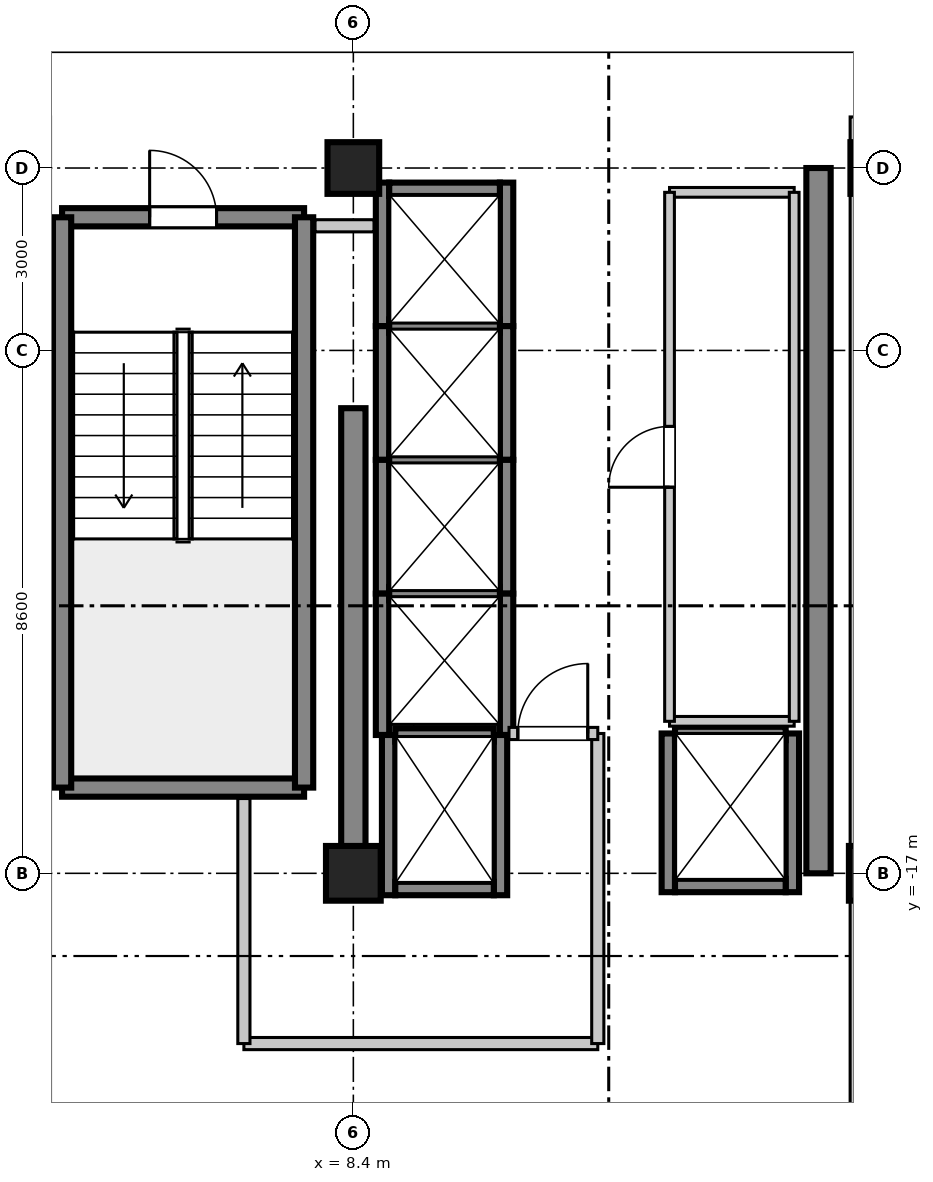
"""IFC4 building model, lengths in metres.
Left out: names, types, materials, properties, quantities, classifications, styles, units other than length and angle.
Written with IfcOpenShell. Run it as: python <this file> out.ifc"""

import sys

from ifc_helpers import new_model, si_unit, direction, frame, frame_2d, origin, origin_2d, place, context, subcontext, project, spatial, rectangle, extrude, source, transform, mapped, element, fill, save


model = new_model("IFC4")
c1 = context("Model", 3, precision=1e-05, world=origin(), true_north=direction((0.0, 1.0)))
c2 = subcontext(c1, "Body", "Model", "MODEL_VIEW")
j1 = project(units=[si_unit("LENGTHUNIT", "METRE"), si_unit("PLANEANGLEUNIT", "RADIAN")], contexts=[c1])
p1 = place(None, origin())
s1 = spatial("IfcSite", under=j1, at=p1, CompositionType="ELEMENT")
p2 = place(p1, origin())
s2 = spatial("IfcBuilding", under=s1, at=p2, CompositionType="ELEMENT")
p3 = place(p2, frame((0.0, 0.0, 296.5)))
s3 = spatial("IfcBuildingStorey", under=s2, at=p3, CompositionType="ELEMENT", Elevation=296.5)
m1 = source(origin(), c2, "Body", "SweptSolid", [
    extrude(rectangle(XDim=0.9, YDim=0.9, at=origin_2d()), origin(), (0.0, 0.0, 1.0), 3.805),
])
p4 = place(p3, frame((8.4, -17.0, 0.0), z_axis=(0.0, 0.0, 1.0), x_axis=(1.0, 0.0, 0.0)))
e1 = element("IfcColumn", 1, at=p4, inside=s3, PredefinedType="COLUMN", context=c2, shape_type="MappedRepresentation", body=[
    mapped(m1, transform((0.0, 0.0, 0.0), scale=1.0)),
])
m2 = source(origin(), c2, "Body", "SweptSolid", [
    extrude(rectangle(XDim=0.85, YDim=0.85, at=origin_2d()), origin(), (0.0, 0.0, 1.0), 3.805),
])
p5 = place(p3, frame((8.4, -5.4, 0.0), z_axis=(0.0, 0.0, 1.0), x_axis=(1.0, 0.0, 0.0)))
e2 = element("IfcColumn", 2, at=p5, inside=s3, PredefinedType="PILASTER", context=c2, shape_type="MappedRepresentation", body=[
    mapped(m2, transform((0.0, 0.0, 0.0), scale=1.0)),
])
p6 = place(p3, frame((17.0, -17.0, 0.0), z_axis=(0.0, 0.0, 1.0), x_axis=(1.0, 0.0, 0.0)))
e3 = element("IfcColumn", 3, at=p6, inside=s3, PredefinedType="COLUMN", context=c2, shape_type="MappedRepresentation", body=[
    mapped(m1, transform((0.0, 0.0, 0.0), scale=1.0)),
])
p7 = place(p3, frame((17.0, -5.4, 0.0), z_axis=(0.0, 0.0, 1.0), x_axis=(1.0, 0.0, 0.0)))
e4 = element("IfcColumn", 4, at=p7, inside=s3, PredefinedType="PILASTER", context=c2, shape_type="MappedRepresentation", body=[
    mapped(m2, transform((0.0, 0.0, 0.0), scale=1.0)),
])
m3 = source(origin(), c2, "Body", "SweptSolid", [
    extrude(rectangle(XDim=7.65, YDim=0.4, at=frame_2d((3.825, 0.0))), origin(), (0.0, 0.0, 1.0), 3.55),
])
p8 = place(p3, frame((8.4, -17.0, 0.0), z_axis=(0.0, 0.0, 1.0), x_axis=(0.0, 1.0, 0.0)))
e5 = element("IfcWall", 5, at=p8, inside=s3, PredefinedType="SHEAR", context=c2, shape_type="MappedRepresentation", body=[
    mapped(m3, transform((0.0, 0.0, 0.0), scale=1.0)),
])
m4 = source(origin(), c2, "Body", "SweptSolid", [
    extrude(rectangle(XDim=11.6, YDim=0.4, at=frame_2d((5.8, 0.0))), origin(), (0.0, 0.0, 1.0), 3.55),
])
p9 = place(p3, frame((16.05, -17.0, 0.0), z_axis=(0.0, 0.0, 1.0), x_axis=(0.0, 1.0, 0.0)))
e6 = element("IfcWall", 6, at=p9, inside=s3, PredefinedType="SHEAR", context=c2, shape_type="MappedRepresentation", body=[
    mapped(m4, transform((0.0, 0.0, 0.0), scale=1.0)),
])
m5 = source(origin(), c2, "Body", "SweptSolid", [
    extrude(rectangle(XDim=3.98, YDim=0.3, at=frame_2d((1.99, 0.0))), origin(), (0.0, 0.0, 1.0), 3.55),
])
p10 = place(p3, frame((3.61, -15.59, 0.0), z_axis=(0.0, 0.0, 1.0), x_axis=(1.0, 0.0, 0.0)))
e7 = element("IfcWall", 7, at=p10, inside=s3, PredefinedType="SHEAR", context=c2, shape_type="MappedRepresentation", body=[
    mapped(m5, transform((0.0, 0.0, 0.0), scale=1.0)),
])
p11 = place(p3, frame((3.61, -6.21, 0.0), z_axis=(0.0, 0.0, 1.0), x_axis=(1.0, 0.0, 0.0)))
e8 = element("IfcWall", 8, at=p11, inside=s3, PredefinedType="SHEAR", context=c2, shape_type="MappedRepresentation", body=[
    mapped(m5, transform((0.0, 0.0, 0.0), scale=1.0)),
])
p12 = place(p11, frame((1.44, 0.0, 0.0)))
e9 = element("IfcOpeningElement", 9, at=p12, cuts=e8, PredefinedType="OPENING", context=c2, shape_type="SweptSolid", body=[
    extrude(rectangle(XDim=1.1, YDim=2.15, at=frame_2d((0.55, 1.075))), frame((0.0, 0.16, 0.0), z_axis=(0.0, -1.0, 0.0), x_axis=(1.0, 0.0, 0.0)), (0.0, 0.0, 1.0), 0.32),
])
m6 = source(origin(), c2, "Body", "SweptSolid", [
    extrude(rectangle(XDim=9.38, YDim=0.3, at=frame_2d((4.69, 0.0))), origin(), (0.0, 0.0, 1.0), 3.55),
])
for number, where, z_axis, x_axis in (
    (10, (3.61, -15.59, 0.0), (0.0, 0.0, 1.0), (0.0, 1.0, 0.0)),
    (11, (7.59, -15.59, 0.0), (0.0, 0.0, 1.0), (0.0, 1.0, 0.0)),
):
    element("IfcWall", number, at=place(p3, frame(where, z_axis=z_axis, x_axis=x_axis)), inside=s3, PredefinedType="SHEAR", context=c2, shape_type="MappedRepresentation", body=[
        mapped(m6, transform((0.0, 0.0, 0.0), scale=1.0)),
    ])
m7 = source(origin(), c2, "Body", "SweptSolid", [
    extrude(rectangle(XDim=2.36, YDim=0.22, at=frame_2d((1.18, 0.0))), origin(), (0.0, 0.0, 1.0), 3.55),
])
for number, where, z_axis, x_axis in (
    (12, (8.88, -8.0, 0.0), (0.0, 0.0, 1.0), (0.0, 1.0, 0.0)),
    (13, (10.92, -8.0, 0.0), (0.0, 0.0, 1.0), (0.0, 1.0, 0.0)),
):
    element("IfcWall", number, at=place(p3, frame(where, z_axis=z_axis, x_axis=x_axis)), inside=s3, PredefinedType="SHEAR", context=c2, shape_type="MappedRepresentation", body=[
        mapped(m7, transform((0.0, 0.0, 0.0), scale=1.0)),
    ])
m8 = source(origin(), c2, "Body", "SweptSolid", [
    extrude(rectangle(XDim=1.82, YDim=0.22, at=frame_2d((0.91, 0.0))), origin(), (0.0, 0.0, 1.0), 3.55),
])
p13 = place(p3, frame((8.99, -5.75, 0.0), z_axis=(0.0, 0.0, 1.0), x_axis=(1.0, 0.0, 0.0)))
e14 = element("IfcWall", 14, at=p13, inside=s3, PredefinedType="SHEAR", context=c2, shape_type="MappedRepresentation", body=[
    mapped(m8, transform((0.0, 0.0, 0.0), scale=1.0)),
])
m9 = source(origin(), c2, "Body", "SweptSolid", [
    extrude(rectangle(XDim=2.2, YDim=0.22, at=frame_2d((1.1, 0.0))), origin(), (0.0, 0.0, 1.0), 3.55),
])
for number, where, z_axis, x_axis in (
    (15, (8.88, -10.2, 0.0), (0.0, 0.0, 1.0), (0.0, 1.0, 0.0)),
    (16, (10.92, -10.2, 0.0), (0.0, 0.0, 1.0), (0.0, 1.0, 0.0)),
):
    element("IfcWall", number, at=place(p3, frame(where, z_axis=z_axis, x_axis=x_axis)), inside=s3, PredefinedType="SHEAR", context=c2, shape_type="MappedRepresentation", body=[
        mapped(m9, transform((0.0, 0.0, 0.0), scale=1.0)),
    ])
m10 = source(origin(), c2, "Body", "SweptSolid", [
    extrude(rectangle(XDim=1.82, YDim=0.22, at=frame_2d((0.91, 0.0))), origin(), (0.0, 0.0, 1.0), 3.85),
])
p14 = place(p3, frame((8.99, -8.0, 0.0), z_axis=(0.0, 0.0, 1.0), x_axis=(1.0, 0.0, 0.0)))
e17 = element("IfcWall", 17, at=p14, inside=s3, PredefinedType="SHEAR", context=c2, shape_type="MappedRepresentation", body=[
    mapped(m10, transform((0.0, 0.0, 0.0), scale=1.0)),
])
for number, where, z_axis, x_axis in (
    (18, (8.88, -12.4, 0.0), (0.0, 0.0, 1.0), (0.0, 1.0, 0.0)),
    (19, (10.92, -12.4, 0.0), (0.0, 0.0, 1.0), (0.0, 1.0, 0.0)),
):
    element("IfcWall", number, at=place(p3, frame(where, z_axis=z_axis, x_axis=x_axis)), inside=s3, PredefinedType="SHEAR", context=c2, shape_type="MappedRepresentation", body=[
        mapped(m9, transform((0.0, 0.0, 0.0), scale=1.0)),
    ])
p15 = place(p3, frame((8.99, -10.2, 0.0), z_axis=(0.0, 0.0, 1.0), x_axis=(1.0, 0.0, 0.0)))
e20 = element("IfcWall", 20, at=p15, inside=s3, PredefinedType="SHEAR", context=c2, shape_type="MappedRepresentation", body=[
    mapped(m10, transform((0.0, 0.0, 0.0), scale=1.0)),
])
m11 = source(origin(), c2, "Body", "SweptSolid", [
    extrude(rectangle(XDim=2.325, YDim=0.22, at=frame_2d((1.163, 0.0))), origin(), (0.0, 0.0, 1.0), 3.55),
])
for number, where, z_axis, x_axis in (
    (21, (8.88, -14.725, 0.0), (0.0, 0.0, 1.0), (0.0, 1.0, 0.0)),
    (22, (10.92, -14.725, 0.0), (0.0, 0.0, 1.0), (0.0, 1.0, 0.0)),
):
    element("IfcWall", number, at=place(p3, frame(where, z_axis=z_axis, x_axis=x_axis)), inside=s3, PredefinedType="SHEAR", context=c2, shape_type="MappedRepresentation", body=[
        mapped(m11, transform((0.0, 0.0, 0.0), scale=1.0)),
    ])
p16 = place(p3, frame((8.99, -12.4, 0.0), z_axis=(0.0, 0.0, 1.0), x_axis=(1.0, 0.0, 0.0)))
e23 = element("IfcWall", 23, at=p16, inside=s3, PredefinedType="SHEAR", context=c2, shape_type="MappedRepresentation", body=[
    mapped(m10, transform((0.0, 0.0, 0.0), scale=1.0)),
])
m12 = source(origin(), c2, "Body", "SweptSolid", [
    extrude(rectangle(XDim=2.635, YDim=0.22, at=frame_2d((1.317, 0.0))), origin(), (0.0, 0.0, 1.0), 3.55),
])
for number, where, z_axis, x_axis in (
    (24, (8.98, -17.36, 0.0), (0.0, 0.0, 1.0), (0.0, 1.0, 0.0)),
    (25, (10.82, -17.36, 0.0), (0.0, 0.0, 1.0), (0.0, 1.0, 0.0)),
):
    element("IfcWall", number, at=place(p3, frame(where, z_axis=z_axis, x_axis=x_axis)), inside=s3, PredefinedType="SHEAR", context=c2, shape_type="MappedRepresentation", body=[
        mapped(m12, transform((0.0, 0.0, 0.0), scale=1.0)),
    ])
m13 = source(origin(), c2, "Body", "SweptSolid", [
    extrude(rectangle(XDim=1.62, YDim=0.22, at=frame_2d((0.81, 0.0))), origin(), (0.0, 0.0, 1.0), 3.55),
])
p17 = place(p3, frame((9.09, -17.25, 0.0), z_axis=(0.0, 0.0, 1.0), x_axis=(1.0, 0.0, 0.0)))
e26 = element("IfcWall", 26, at=p17, inside=s3, PredefinedType="SHEAR", context=c2, shape_type="MappedRepresentation", body=[
    mapped(m13, transform((0.0, 0.0, 0.0), scale=1.0)),
])
m14 = source(origin(), c2, "Body", "SweptSolid", [
    extrude(rectangle(XDim=1.62, YDim=0.22, at=frame_2d((0.81, 0.0))), origin(), (0.0, 0.0, 1.0), 3.85),
])
p18 = place(p3, frame((9.09, -14.725, 0.0), z_axis=(0.0, 0.0, 1.0), x_axis=(1.0, 0.0, 0.0)))
e27 = element("IfcWall", 27, at=p18, inside=s3, PredefinedType="SHEAR", context=c2, shape_type="MappedRepresentation", body=[
    mapped(m14, transform((0.0, 0.0, 0.0), scale=1.0)),
])
m15 = source(origin(), c2, "Body", "SweptSolid", [
    extrude(rectangle(XDim=2.61, YDim=0.22, at=frame_2d((1.305, 0.0))), origin(), (0.0, 0.0, 1.0), 3.55),
])
for number, where, z_axis, x_axis in (
    (28, (13.58, -17.31, 0.0), (0.0, 0.0, 1.0), (0.0, 1.0, 0.0)),
    (29, (15.62, -17.31, 0.0), (0.0, 0.0, 1.0), (0.0, 1.0, 0.0)),
):
    element("IfcWall", number, at=place(p3, frame(where, z_axis=z_axis, x_axis=x_axis)), inside=s3, PredefinedType="SHEAR", context=c2, shape_type="MappedRepresentation", body=[
        mapped(m15, transform((0.0, 0.0, 0.0), scale=1.0)),
    ])
p19 = place(p3, frame((13.69, -17.2, 0.0), z_axis=(0.0, 0.0, 1.0), x_axis=(1.0, 0.0, 0.0)))
e30 = element("IfcWall", 30, at=p19, inside=s3, PredefinedType="SHEAR", context=c2, shape_type="MappedRepresentation", body=[
    mapped(m8, transform((0.0, 0.0, 0.0), scale=1.0)),
])
p20 = place(p3, frame((13.69, -14.7, 0.0), z_axis=(0.0, 0.0, 1.0), x_axis=(1.0, 0.0, 0.0)))
e31 = element("IfcWall", 31, at=p20, inside=s3, PredefinedType="SHEAR", context=c2, shape_type="MappedRepresentation", body=[
    mapped(m10, transform((0.0, 0.0, 0.0), scale=1.0)),
])
m16 = source(origin(), c2, "Body", "SweptSolid", [
    extrude(rectangle(XDim=5.82, YDim=0.2, at=frame_2d((2.91, 0.0))), origin(), (0.0, 0.0, 1.0), 2.89),
])
p21 = place(p3, frame((6.6, -19.8, 0.0), z_axis=(0.0, 0.0, 1.0), x_axis=(1.0, 0.0, 0.0)))
e32 = element("IfcWall", 32, at=p21, inside=s3, PredefinedType="PARTITIONING", context=c2, shape_type="MappedRepresentation", body=[
    mapped(m16, transform((0.0, 0.0, 0.0), scale=1.0)),
])
m17 = source(origin(), c2, "Body", "SweptSolid", [
    extrude(rectangle(XDim=4.03, YDim=0.2, at=frame_2d((2.015, 0.0))), origin(), (0.0, 0.0, 1.0), 2.89),
])
p22 = place(p3, frame((6.6, -19.8, 0.0), z_axis=(0.0, 0.0, 1.0), x_axis=(0.0, 1.0, 0.0)))
e33 = element("IfcWall", 33, at=p22, inside=s3, PredefinedType="PARTITIONING", context=c2, shape_type="MappedRepresentation", body=[
    mapped(m17, transform((0.0, 0.0, 0.0), scale=1.0)),
])
m18 = source(origin(), c2, "Body", "SweptSolid", [
    extrude(rectangle(XDim=5.1, YDim=0.2, at=frame_2d((2.55, 0.0))), origin(), (0.0, 0.0, 1.0), 2.89),
])
p23 = place(p3, frame((12.42, -19.8, 0.0), z_axis=(0.0, 0.0, 1.0), x_axis=(0.0, 1.0, 0.0)))
e34 = element("IfcWall", 34, at=p23, inside=s3, PredefinedType="PARTITIONING", context=c2, shape_type="MappedRepresentation", body=[
    mapped(m18, transform((0.0, 0.0, 0.0), scale=1.0)),
])
m19 = source(origin(), c2, "Body", "SweptSolid", [
    extrude(rectangle(XDim=1.46, YDim=0.2, at=frame_2d((0.73, 0.0))), origin(), (0.0, 0.0, 1.0), 2.89),
])
p24 = place(p3, frame((10.96, -14.7, 0.0), z_axis=(0.0, 0.0, 1.0), x_axis=(1.0, 0.0, 0.0)))
e35 = element("IfcWall", 35, at=p24, inside=s3, PredefinedType="PARTITIONING", context=c2, shape_type="MappedRepresentation", body=[
    mapped(m19, transform((0.0, 0.0, 0.0), scale=1.0)),
])
p25 = place(p24, frame((0.145, 0.0, 0.0)))
e36 = element("IfcOpeningElement", 36, at=p25, cuts=e35, PredefinedType="OPENING", context=c2, shape_type="SweptSolid", body=[
    extrude(rectangle(XDim=1.15, YDim=2.15, at=frame_2d((0.575, 1.075))), frame((0.0, 0.11, 0.0), z_axis=(0.0, -1.0, 0.0), x_axis=(1.0, 0.0, 0.0)), (0.0, 0.0, 1.0), 0.22),
])
m20 = source(origin(), c2, "Body", "SweptSolid", [
    extrude(rectangle(XDim=0.97, YDim=0.2, at=frame_2d((0.485, 0.0))), origin(), (0.0, 0.0, 1.0), 2.89),
])
p26 = place(p3, frame((7.77, -6.35, 0.0), z_axis=(0.0, 0.0, 1.0), x_axis=(1.0, 0.0, 0.0)))
e37 = element("IfcWall", 37, at=p26, inside=s3, PredefinedType="PARTITIONING", context=c2, shape_type="MappedRepresentation", body=[
    mapped(m20, transform((0.0, 0.0, 0.0), scale=1.0)),
])
m21 = source(origin(), c2, "Body", "SweptSolid", [
    extrude(rectangle(XDim=2.05, YDim=0.16, at=frame_2d((1.025, 0.0))), origin(), (0.0, 0.0, 1.0), 2.89),
])
for number, where, z_axis, x_axis in (
    (38, (13.6, -14.5, 0.0), (0.0, 0.0, 1.0), (1.0, 0.0, 0.0)),
    (39, (13.6, -5.8, 0.0), (0.0, 0.0, 1.0), (1.0, 0.0, 0.0)),
):
    element("IfcWall", number, at=place(p3, frame(where, z_axis=z_axis, x_axis=x_axis)), inside=s3, PredefinedType="PARTITIONING", context=c2, shape_type="MappedRepresentation", body=[
        mapped(m21, transform((0.0, 0.0, 0.0), scale=1.0)),
    ])
m22 = source(origin(), c2, "Body", "SweptSolid", [
    extrude(rectangle(XDim=8.7, YDim=0.16, at=frame_2d((4.35, 0.0))), origin(), (0.0, 0.0, 1.0), 2.89),
])
p27 = place(p3, frame((13.6, -14.5, 0.0), z_axis=(0.0, 0.0, 1.0), x_axis=(0.0, 1.0, 0.0)))
e40 = element("IfcWall", 40, at=p27, inside=s3, PredefinedType="PARTITIONING", context=c2, shape_type="MappedRepresentation", body=[
    mapped(m22, transform((0.0, 0.0, 0.0), scale=1.0)),
])
p28 = place(p27, frame((3.85, 0.0, 0.0)))
e41 = element("IfcOpeningElement", 41, at=p28, cuts=e40, PredefinedType="OPENING", context=c2, shape_type="SweptSolid", body=[
    extrude(rectangle(XDim=1.0, YDim=2.1, at=frame_2d((0.5, 1.05))), frame((0.0, 0.09, 0.0), z_axis=(0.0, -1.0, 0.0), x_axis=(1.0, 0.0, 0.0)), (0.0, 0.0, 1.0), 0.18),
])
p29 = place(p3, frame((15.65, -14.5, 0.0), z_axis=(0.0, 0.0, 1.0), x_axis=(0.0, 1.0, 0.0)))
e42 = element("IfcWall", 42, at=p29, inside=s3, PredefinedType="PARTITIONING", context=c2, shape_type="MappedRepresentation", body=[
    mapped(m22, transform((0.0, 0.0, 0.0), scale=1.0)),
])
m23 = source(origin(), c2, "Body", "SweptSolid", [
    extrude(rectangle(XDim=17.74, YDim=0.16, at=frame_2d((8.87, 0.0))), origin(), (0.0, 0.0, 1.0), 2.89),
])
p30 = place(p3, frame((16.65, -22.3, 0.0), z_axis=(0.0, 0.0, 1.0), x_axis=(0.0, 1.0, 0.0)))
e43 = element("IfcWall", 43, at=p30, inside=s3, PredefinedType="PARTITIONING", context=c2, shape_type="MappedRepresentation", body=[
    mapped(m23, transform((0.0, 0.0, 0.0), scale=1.0)),
])
m24 = source(origin(), c2, "Body", "SweptSolid", [
    extrude(rectangle(XDim=1.1, YDim=2.15, at=frame_2d((0.55, 1.075))), frame((0.0, 0.025, 0.0), z_axis=(0.0, -1.0, 0.0), x_axis=(1.0, 0.0, 0.0)), (0.0, 0.0, 1.0), 0.05),
])
p31 = place(p12, frame((1.1, 0.0, 0.0), z_axis=(0.0, 0.0, 1.0), x_axis=(-1.0, 0.0, 0.0)))
e44 = element("IfcDoor", 44, at=p31, inside=s3, OperationType="SINGLE_SWING_LEFT", PredefinedType="DOOR", context=c2, shape_type="MappedRepresentation", body=[
    mapped(m24, transform((0.0, 0.0, 0.0), scale=1.0)),
])
fill(e9, e44)
m25 = source(origin(), c2, "Body", "SweptSolid", [
    extrude(rectangle(XDim=1.15, YDim=2.15, at=frame_2d((0.575, 1.075))), frame((0.0, 0.025, 0.0), z_axis=(0.0, -1.0, 0.0), x_axis=(1.0, 0.0, 0.0)), (0.0, 0.0, 1.0), 0.05),
])
p32 = place(p25, origin())
e45 = element("IfcDoor", 45, at=p32, inside=s3, OperationType="SINGLE_SWING_RIGHT", PredefinedType="DOOR", context=c2, shape_type="MappedRepresentation", body=[
    mapped(m25, transform((0.0, 0.0, 0.0), scale=1.0)),
])
fill(e36, e45)
m26 = source(origin(), c2, "Body", "SweptSolid", [
    extrude(rectangle(XDim=1.0, YDim=2.1, at=frame_2d((0.5, 1.05))), frame((0.0, 0.025, 0.0), z_axis=(0.0, -1.0, 0.0), x_axis=(1.0, 0.0, 0.0)), (0.0, 0.0, 1.0), 0.05),
])
p33 = place(p28, frame((1.0, 0.0, 0.0), z_axis=(0.0, 0.0, 1.0), x_axis=(-1.0, 0.0, 0.0)))
e46 = element("IfcDoor", 46, at=p33, inside=s3, OperationType="SINGLE_SWING_LEFT", PredefinedType="DOOR", context=c2, shape_type="MappedRepresentation", body=[
    mapped(m26, transform((0.0, 0.0, 0.0), scale=1.0)),
])
fill(e41, e46)
save(model, sys.argv[1])
